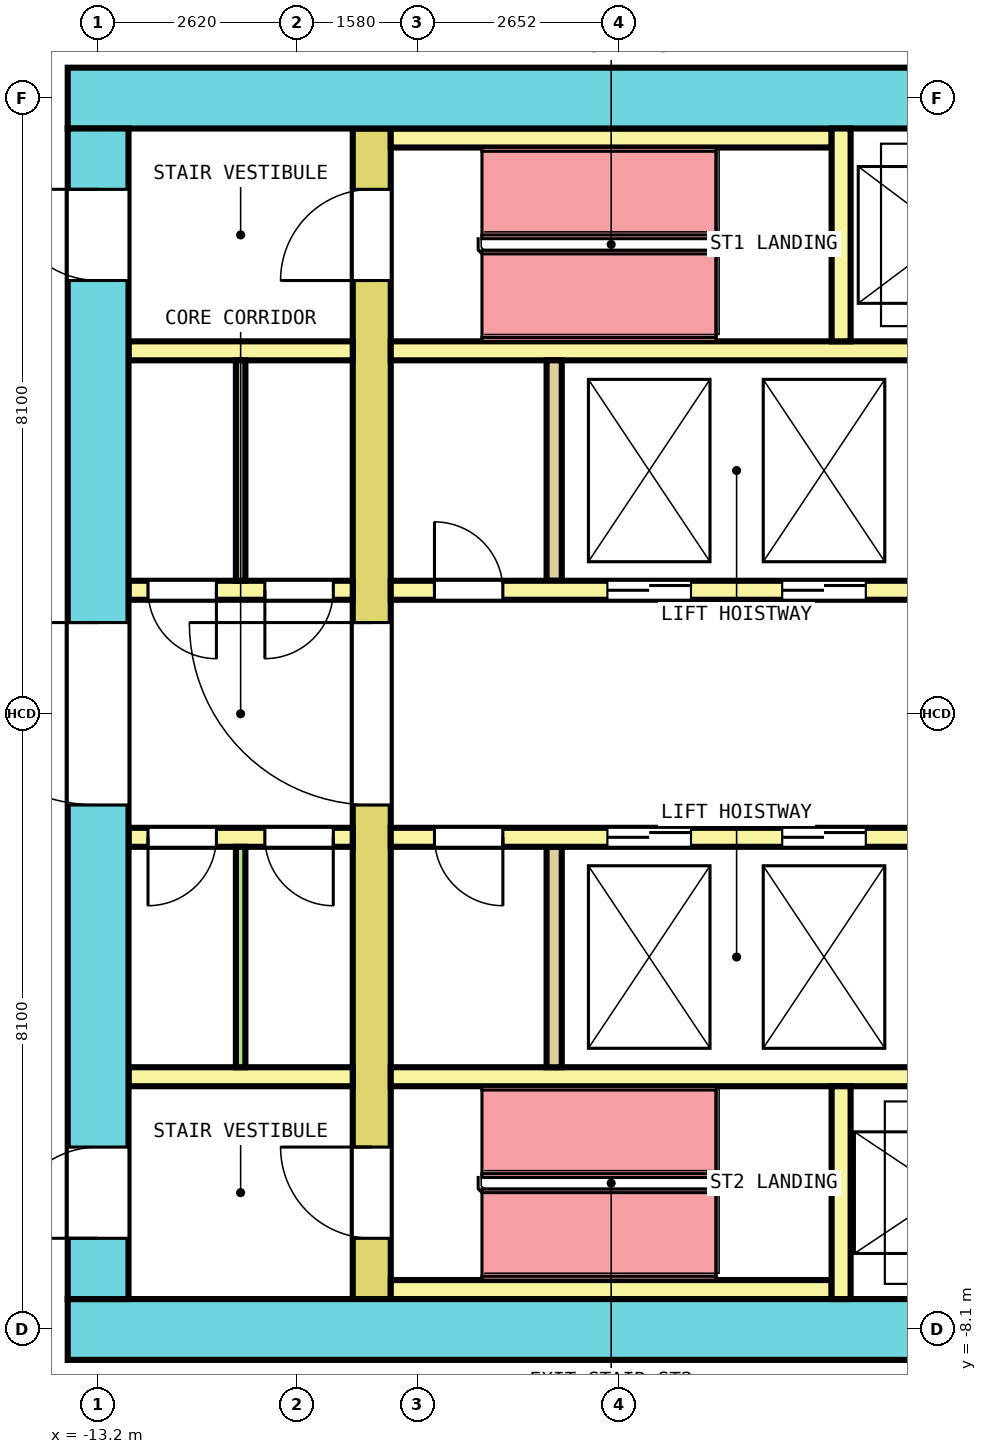
"""IFC4 building model, lengths in metres.
Left out: names, types, materials, properties, quantities, classifications, styles, units other than length and angle.
Written with IfcOpenShell. Run it as: python <this file> out.ifc"""

import sys

from ifc_helpers import new_model, si_unit, direction, frame, frame_2d, origin, place, context, subcontext, project, spatial, rectangle, extrude, element, fill, save


model = new_model("IFC4")
c1 = context("Model", 3, precision=1e-05, world=origin(), true_north=direction((0.0, 1.0)))
c2 = subcontext(c1, "Body", "Model", "MODEL_VIEW")
j1 = project(units=[si_unit("LENGTHUNIT", "METRE"), si_unit("PLANEANGLEUNIT", "RADIAN")], contexts=[c1])
p1 = place(None, origin())
s1 = spatial("IfcSite", under=j1, at=p1, CompositionType="ELEMENT")
p2 = place(p1, origin())
s2 = spatial("IfcBuilding", under=s1, at=p2, CompositionType="ELEMENT")
p3 = place(p2, frame((0.0, 0.0, 122.0)))
s3 = spatial("IfcBuildingStorey", under=s2, at=p3, CompositionType="ELEMENT", Elevation=122.0)
p4 = place(p3, frame((-13.6, 8.1, 0.0), z_axis=(0.0, 0.0, 1.0), x_axis=(1.0, 0.0, 0.0)))
e1 = element("IfcWall", 1, at=p4, inside=s3, PredefinedType="SHEAR", context=c2, shape_type="SweptSolid", body=[
    extrude(rectangle(XDim=27.2, YDim=0.8, at=frame_2d((13.6, 0.0))), origin(), (0.0, 0.0, 1.0), 4.1),
])
p5 = place(p4, frame((14.525, 0.0, 0.0)))
e2 = element("IfcOpeningElement", 2, at=p5, cuts=e1, PredefinedType="OPENING", context=c2, shape_type="SweptSolid", body=[
    extrude(rectangle(XDim=1.4, YDim=2.1, at=frame_2d((0.7, 1.05))), frame((0.0, 0.41, 0.0), z_axis=(0.0, -1.0, 0.0), x_axis=(1.0, 0.0, 0.0)), (0.0, 0.0, 1.0), 0.82),
])
p6 = place(p3, frame((-13.6, -8.1, 0.0), z_axis=(0.0, 0.0, 1.0), x_axis=(1.0, 0.0, 0.0)))
e3 = element("IfcWall", 3, at=p6, inside=s3, PredefinedType="SHEAR", context=c2, shape_type="SweptSolid", body=[
    extrude(rectangle(XDim=27.2, YDim=0.8, at=frame_2d((13.6, 0.0))), origin(), (0.0, 0.0, 1.0), 4.1),
])
p7 = place(p6, frame((15.15, 0.0, 0.0)))
e4 = element("IfcOpeningElement", 4, at=p7, cuts=e3, PredefinedType="OPENING", context=c2, shape_type="SweptSolid", body=[
    extrude(rectangle(XDim=1.2, YDim=2.1, at=frame_2d((0.6, 1.05))), frame((0.0, 0.41, 0.0), z_axis=(0.0, -1.0, 0.0), x_axis=(1.0, 0.0, 0.0)), (0.0, 0.0, 1.0), 0.82),
])
p8 = place(p3, frame((-13.2, -7.7, 0.0), z_axis=(0.0, 0.0, 1.0), x_axis=(0.0, 1.0, 0.0)))
e5 = element("IfcWall", 5, at=p8, inside=s3, PredefinedType="SHEAR", context=c2, shape_type="SweptSolid", body=[
    extrude(rectangle(XDim=15.4, YDim=0.8, at=frame_2d((7.7, 0.0))), origin(), (0.0, 0.0, 1.0), 4.1),
])
p9 = place(p8, frame((6.5, 0.0, 0.0)))
e6 = element("IfcOpeningElement", 6, at=p9, cuts=e5, PredefinedType="OPENING", context=c2, shape_type="SweptSolid", body=[
    extrude(rectangle(XDim=2.4, YDim=2.1, at=frame_2d((1.2, 1.05))), frame((0.0, 0.41, 0.0), z_axis=(0.0, -1.0, 0.0), x_axis=(1.0, 0.0, 0.0)), (0.0, 0.0, 1.0), 0.82),
])
p10 = place(p8, frame((13.4, 0.0, 0.0)))
e7 = element("IfcOpeningElement", 7, at=p10, cuts=e5, PredefinedType="OPENING", context=c2, shape_type="SweptSolid", body=[
    extrude(rectangle(XDim=1.2, YDim=2.1, at=frame_2d((0.6, 1.05))), frame((0.0, 0.41, 0.0), z_axis=(0.0, -1.0, 0.0), x_axis=(1.0, 0.0, 0.0)), (0.0, 0.0, 1.0), 0.82),
])
p11 = place(p8, frame((0.8, 0.0, 0.0)))
e8 = element("IfcOpeningElement", 8, at=p11, cuts=e5, PredefinedType="OPENING", context=c2, shape_type="SweptSolid", body=[
    extrude(rectangle(XDim=1.2, YDim=2.1, at=frame_2d((0.6, 1.05))), frame((0.0, 0.41, 0.0), z_axis=(0.0, -1.0, 0.0), x_axis=(1.0, 0.0, 0.0)), (0.0, 0.0, 1.0), 0.82),
])
p12 = place(p3, frame((-9.6, -7.7, 0.0), z_axis=(0.0, 0.0, 1.0), x_axis=(0.0, 1.0, 0.0)))
e9 = element("IfcWall", 9, at=p12, inside=s3, PredefinedType="SHEAR", context=c2, shape_type="SweptSolid", body=[
    extrude(rectangle(XDim=15.4, YDim=0.5, at=frame_2d((7.7, 0.0))), origin(), (0.0, 0.0, 1.0), 4.1),
])
p13 = place(p12, frame((6.5, 0.0, 0.0)))
e10 = element("IfcOpeningElement", 10, at=p13, cuts=e9, PredefinedType="OPENING", context=c2, shape_type="SweptSolid", body=[
    extrude(rectangle(XDim=2.4, YDim=2.1, at=frame_2d((1.2, 1.05))), frame((0.0, 0.26, 0.0), z_axis=(0.0, -1.0, 0.0), x_axis=(1.0, 0.0, 0.0)), (0.0, 0.0, 1.0), 0.52),
])
p14 = place(p12, frame((13.4, 0.0, 0.0)))
e11 = element("IfcOpeningElement", 11, at=p14, cuts=e9, PredefinedType="OPENING", context=c2, shape_type="SweptSolid", body=[
    extrude(rectangle(XDim=1.2, YDim=2.1, at=frame_2d((0.6, 1.05))), frame((0.0, 0.26, 0.0), z_axis=(0.0, -1.0, 0.0), x_axis=(1.0, 0.0, 0.0)), (0.0, 0.0, 1.0), 0.52),
])
p15 = place(p12, frame((0.8, 0.0, 0.0)))
e12 = element("IfcOpeningElement", 12, at=p15, cuts=e9, PredefinedType="OPENING", context=c2, shape_type="SweptSolid", body=[
    extrude(rectangle(XDim=1.2, YDim=2.1, at=frame_2d((0.6, 1.05))), frame((0.0, 0.26, 0.0), z_axis=(0.0, -1.0, 0.0), x_axis=(1.0, 0.0, 0.0)), (0.0, 0.0, 1.0), 0.52),
])
p16 = place(p3, frame((-12.8, 1.625, 0.0), z_axis=(0.0, 0.0, 1.0), x_axis=(1.0, 0.0, 0.0)))
e13 = element("IfcWall", 13, at=p16, inside=s3, PredefinedType="SOLIDWALL", context=c2, shape_type="SweptSolid", body=[
    extrude(rectangle(XDim=2.95, YDim=0.25, at=frame_2d((1.475, 0.0))), origin(), (0.0, 0.0, 1.0), 4.1),
])
p17 = place(p16, frame((0.256, 0.0, 0.0)))
e14 = element("IfcOpeningElement", 14, at=p17, cuts=e13, PredefinedType="OPENING", context=c2, shape_type="SweptSolid", body=[
    extrude(rectangle(XDim=0.9, YDim=2.1, at=frame_2d((0.45, 1.05))), frame((0.0, 0.135, 0.0), z_axis=(0.0, -1.0, 0.0), x_axis=(1.0, 0.0, 0.0)), (0.0, 0.0, 1.0), 0.27),
])
p18 = place(p16, frame((1.794, 0.0, 0.0)))
e15 = element("IfcOpeningElement", 15, at=p18, cuts=e13, PredefinedType="OPENING", context=c2, shape_type="SweptSolid", body=[
    extrude(rectangle(XDim=0.9, YDim=2.1, at=frame_2d((0.45, 1.05))), frame((0.0, 0.135, 0.0), z_axis=(0.0, -1.0, 0.0), x_axis=(1.0, 0.0, 0.0)), (0.0, 0.0, 1.0), 0.27),
])
p19 = place(p3, frame((-9.35, 1.625, 0.0), z_axis=(0.0, 0.0, 1.0), x_axis=(1.0, 0.0, 0.0)))
e16 = element("IfcWall", 16, at=p19, inside=s3, PredefinedType="SOLIDWALL", context=c2, shape_type="SweptSolid", body=[
    extrude(rectangle(XDim=18.7, YDim=0.25, at=frame_2d((9.35, 0.0))), origin(), (0.0, 0.0, 1.0), 4.1),
])
p20 = place(p19, frame((2.85, 0.0, 0.0)))
e17 = element("IfcOpeningElement", 17, at=p20, cuts=e16, PredefinedType="OPENING", context=c2, shape_type="SweptSolid", body=[
    extrude(rectangle(XDim=1.1, YDim=2.1, at=frame_2d((0.55, 1.05))), frame((0.0, 0.135, 0.0), z_axis=(0.0, -1.0, 0.0), x_axis=(1.0, 0.0, 0.0)), (0.0, 0.0, 1.0), 0.27),
])
p21 = place(p19, frame((5.15, 0.0, 0.0)))
e18 = element("IfcOpeningElement", 18, at=p21, cuts=e16, PredefinedType="OPENING", context=c2, shape_type="SweptSolid", body=[
    extrude(rectangle(XDim=1.1, YDim=2.1, at=frame_2d((0.55, 1.05))), frame((0.0, 0.135, 0.0), z_axis=(0.0, -1.0, 0.0), x_axis=(1.0, 0.0, 0.0)), (0.0, 0.0, 1.0), 0.27),
])
p22 = place(p19, frame((14.8, 0.0, 0.0)))
e19 = element("IfcOpeningElement", 19, at=p22, cuts=e16, PredefinedType="OPENING", context=c2, shape_type="SweptSolid", body=[
    extrude(rectangle(XDim=1.1, YDim=2.1, at=frame_2d((0.55, 1.05))), frame((0.0, 0.135, 0.0), z_axis=(0.0, -1.0, 0.0), x_axis=(1.0, 0.0, 0.0)), (0.0, 0.0, 1.0), 0.27),
])
p23 = place(p19, frame((0.575, 0.0, 0.0)))
e20 = element("IfcOpeningElement", 20, at=p23, cuts=e16, PredefinedType="OPENING", context=c2, shape_type="SweptSolid", body=[
    extrude(rectangle(XDim=0.9, YDim=2.1, at=frame_2d((0.45, 1.05))), frame((0.0, 0.135, 0.0), z_axis=(0.0, -1.0, 0.0), x_axis=(1.0, 0.0, 0.0)), (0.0, 0.0, 1.0), 0.27),
])
p24 = place(p19, frame((17.225, 0.0, 0.0)))
e21 = element("IfcOpeningElement", 21, at=p24, cuts=e16, PredefinedType="OPENING", context=c2, shape_type="SweptSolid", body=[
    extrude(rectangle(XDim=0.9, YDim=2.1, at=frame_2d((0.45, 1.05))), frame((0.0, 0.135, 0.0), z_axis=(0.0, -1.0, 0.0), x_axis=(1.0, 0.0, 0.0)), (0.0, 0.0, 1.0), 0.27),
])
p25 = place(p3, frame((-12.8, 4.775, 0.0), z_axis=(0.0, 0.0, 1.0), x_axis=(1.0, 0.0, 0.0)))
e22 = element("IfcWall", 22, at=p25, inside=s3, PredefinedType="SOLIDWALL", context=c2, shape_type="SweptSolid", body=[
    extrude(rectangle(XDim=2.95, YDim=0.25, at=frame_2d((1.475, 0.0))), origin(), (0.0, 0.0, 1.0), 4.1),
])
p26 = place(p3, frame((-9.35, 4.775, 0.0), z_axis=(0.0, 0.0, 1.0), x_axis=(1.0, 0.0, 0.0)))
e23 = element("IfcWall", 23, at=p26, inside=s3, PredefinedType="SOLIDWALL", context=c2, shape_type="SweptSolid", body=[
    extrude(rectangle(XDim=18.7, YDim=0.25, at=frame_2d((9.35, 0.0))), origin(), (0.0, 0.0, 1.0), 4.1),
])
p27 = place(p3, frame((-7.2, 1.75, 0.0), z_axis=(0.0, 0.0, 1.0), x_axis=(0.0, 1.0, 0.0)))
e24 = element("IfcWall", 24, at=p27, inside=s3, PredefinedType="SOLIDWALL", context=c2, shape_type="SweptSolid", body=[
    extrude(rectangle(XDim=2.9, YDim=0.2, at=frame_2d((1.45, 0.0))), origin(), (0.0, 0.0, 1.0), 4.1),
])
p28 = place(p3, frame((-12.8, -1.625, 0.0), z_axis=(0.0, 0.0, 1.0), x_axis=(1.0, 0.0, 0.0)))
e25 = element("IfcWall", 25, at=p28, inside=s3, PredefinedType="SOLIDWALL", context=c2, shape_type="SweptSolid", body=[
    extrude(rectangle(XDim=2.95, YDim=0.25, at=frame_2d((1.475, 0.0))), origin(), (0.0, 0.0, 1.0), 4.1),
])
p29 = place(p28, frame((0.256, 0.0, 0.0)))
e26 = element("IfcOpeningElement", 26, at=p29, cuts=e25, PredefinedType="OPENING", context=c2, shape_type="SweptSolid", body=[
    extrude(rectangle(XDim=0.9, YDim=2.1, at=frame_2d((0.45, 1.05))), frame((0.0, 0.135, 0.0), z_axis=(0.0, -1.0, 0.0), x_axis=(1.0, 0.0, 0.0)), (0.0, 0.0, 1.0), 0.27),
])
p30 = place(p28, frame((1.794, 0.0, 0.0)))
e27 = element("IfcOpeningElement", 27, at=p30, cuts=e25, PredefinedType="OPENING", context=c2, shape_type="SweptSolid", body=[
    extrude(rectangle(XDim=0.9, YDim=2.1, at=frame_2d((0.45, 1.05))), frame((0.0, 0.135, 0.0), z_axis=(0.0, -1.0, 0.0), x_axis=(1.0, 0.0, 0.0)), (0.0, 0.0, 1.0), 0.27),
])
p31 = place(p3, frame((-9.35, -1.625, 0.0), z_axis=(0.0, 0.0, 1.0), x_axis=(1.0, 0.0, 0.0)))
e28 = element("IfcWall", 28, at=p31, inside=s3, PredefinedType="SOLIDWALL", context=c2, shape_type="SweptSolid", body=[
    extrude(rectangle(XDim=18.7, YDim=0.25, at=frame_2d((9.35, 0.0))), origin(), (0.0, 0.0, 1.0), 4.1),
])
p32 = place(p31, frame((2.85, 0.0, 0.0)))
e29 = element("IfcOpeningElement", 29, at=p32, cuts=e28, PredefinedType="OPENING", context=c2, shape_type="SweptSolid", body=[
    extrude(rectangle(XDim=1.1, YDim=2.1, at=frame_2d((0.55, 1.05))), frame((0.0, 0.135, 0.0), z_axis=(0.0, -1.0, 0.0), x_axis=(1.0, 0.0, 0.0)), (0.0, 0.0, 1.0), 0.27),
])
p33 = place(p31, frame((5.15, 0.0, 0.0)))
e30 = element("IfcOpeningElement", 30, at=p33, cuts=e28, PredefinedType="OPENING", context=c2, shape_type="SweptSolid", body=[
    extrude(rectangle(XDim=1.1, YDim=2.1, at=frame_2d((0.55, 1.05))), frame((0.0, 0.135, 0.0), z_axis=(0.0, -1.0, 0.0), x_axis=(1.0, 0.0, 0.0)), (0.0, 0.0, 1.0), 0.27),
])
p34 = place(p31, frame((14.8, 0.0, 0.0)))
e31 = element("IfcOpeningElement", 31, at=p34, cuts=e28, PredefinedType="OPENING", context=c2, shape_type="SweptSolid", body=[
    extrude(rectangle(XDim=1.1, YDim=2.1, at=frame_2d((0.55, 1.05))), frame((0.0, 0.135, 0.0), z_axis=(0.0, -1.0, 0.0), x_axis=(1.0, 0.0, 0.0)), (0.0, 0.0, 1.0), 0.27),
])
p35 = place(p31, frame((0.575, 0.0, 0.0)))
e32 = element("IfcOpeningElement", 32, at=p35, cuts=e28, PredefinedType="OPENING", context=c2, shape_type="SweptSolid", body=[
    extrude(rectangle(XDim=0.9, YDim=2.1, at=frame_2d((0.45, 1.05))), frame((0.0, 0.135, 0.0), z_axis=(0.0, -1.0, 0.0), x_axis=(1.0, 0.0, 0.0)), (0.0, 0.0, 1.0), 0.27),
])
p36 = place(p31, frame((17.225, 0.0, 0.0)))
e33 = element("IfcOpeningElement", 33, at=p36, cuts=e28, PredefinedType="OPENING", context=c2, shape_type="SweptSolid", body=[
    extrude(rectangle(XDim=0.9, YDim=2.1, at=frame_2d((0.45, 1.05))), frame((0.0, 0.135, 0.0), z_axis=(0.0, -1.0, 0.0), x_axis=(1.0, 0.0, 0.0)), (0.0, 0.0, 1.0), 0.27),
])
p37 = place(p3, frame((-12.8, -4.775, 0.0), z_axis=(0.0, 0.0, 1.0), x_axis=(1.0, 0.0, 0.0)))
e34 = element("IfcWall", 34, at=p37, inside=s3, PredefinedType="SOLIDWALL", context=c2, shape_type="SweptSolid", body=[
    extrude(rectangle(XDim=2.95, YDim=0.25, at=frame_2d((1.475, 0.0))), origin(), (0.0, 0.0, 1.0), 4.1),
])
p38 = place(p3, frame((-9.35, -4.775, 0.0), z_axis=(0.0, 0.0, 1.0), x_axis=(1.0, 0.0, 0.0)))
e35 = element("IfcWall", 35, at=p38, inside=s3, PredefinedType="SOLIDWALL", context=c2, shape_type="SweptSolid", body=[
    extrude(rectangle(XDim=18.7, YDim=0.25, at=frame_2d((9.35, 0.0))), origin(), (0.0, 0.0, 1.0), 4.1),
])
p39 = place(p3, frame((-7.2, -4.65, 0.0), z_axis=(0.0, 0.0, 1.0), x_axis=(0.0, 1.0, 0.0)))
e36 = element("IfcWall", 36, at=p39, inside=s3, PredefinedType="SOLIDWALL", context=c2, shape_type="SweptSolid", body=[
    extrude(rectangle(XDim=2.9, YDim=0.2, at=frame_2d((1.45, 0.0))), origin(), (0.0, 0.0, 1.0), 4.1),
])
p40 = place(p3, frame((-9.35, 7.575, 0.0), z_axis=(0.0, 0.0, 1.0), x_axis=(1.0, 0.0, 0.0)))
e37 = element("IfcWall", 37, at=p40, inside=s3, PredefinedType="SOLIDWALL", context=c2, shape_type="SweptSolid", body=[
    extrude(rectangle(XDim=5.8, YDim=0.25, at=frame_2d((2.9, 0.0))), origin(), (0.0, 0.0, 1.0), 4.1),
])
p41 = place(p3, frame((-3.425, 4.9, 0.0), z_axis=(0.0, 0.0, 1.0), x_axis=(0.0, 1.0, 0.0)))
e38 = element("IfcWall", 38, at=p41, inside=s3, PredefinedType="SOLIDWALL", context=c2, shape_type="SweptSolid", body=[
    extrude(rectangle(XDim=2.8, YDim=0.25, at=frame_2d((1.4, 0.0))), origin(), (0.0, 0.0, 1.0), 4.1),
])
p42 = place(p3, frame((-9.35, -7.575, 0.0), z_axis=(0.0, 0.0, 1.0), x_axis=(1.0, 0.0, 0.0)))
e39 = element("IfcWall", 39, at=p42, inside=s3, PredefinedType="SOLIDWALL", context=c2, shape_type="SweptSolid", body=[
    extrude(rectangle(XDim=5.8, YDim=0.25, at=frame_2d((2.9, 0.0))), origin(), (0.0, 0.0, 1.0), 4.1),
])
p43 = place(p3, frame((-3.425, -7.7, 0.0), z_axis=(0.0, 0.0, 1.0), x_axis=(0.0, 1.0, 0.0)))
e40 = element("IfcWall", 40, at=p43, inside=s3, PredefinedType="SOLIDWALL", context=c2, shape_type="SweptSolid", body=[
    extrude(rectangle(XDim=2.8, YDim=0.25, at=frame_2d((1.4, 0.0))), origin(), (0.0, 0.0, 1.0), 4.1),
])
for number, where, z_axis, x_axis in (
    (41, (-11.325, 1.75, 0.0), (0.0, 0.0, 1.0), (0.0, 1.0, 0.0)),
    (42, (-11.325, -4.65, 0.0), (0.0, 0.0, 1.0), (0.0, 1.0, 0.0)),
):
    element("IfcWall", number, at=place(p3, frame(where, z_axis=z_axis, x_axis=x_axis)), inside=s3, PredefinedType="PARTITIONING", context=c2, shape_type="SweptSolid", body=[
        extrude(rectangle(XDim=2.9, YDim=0.125, at=frame_2d((1.45, 0.0))), origin(), (0.0, 0.0, 1.0), 4.1),
    ])
p44 = place(p20, origin())
e43 = element("IfcDoor", 43, at=p44, inside=s3, OperationType="DOUBLE_DOOR_SLIDING", PredefinedType="DOOR", context=c2, shape_type="SweptSolid", body=[
    extrude(rectangle(XDim=1.1, YDim=2.1, at=frame_2d((0.55, 1.05))), frame((0.0, 0.075, 0.0), z_axis=(0.0, -1.0, 0.0), x_axis=(1.0, 0.0, 0.0)), (0.0, 0.0, 1.0), 0.15),
])
fill(e17, e43)
p45 = place(p21, origin())
e44 = element("IfcDoor", 44, at=p45, inside=s3, OperationType="DOUBLE_DOOR_SLIDING", PredefinedType="DOOR", context=c2, shape_type="SweptSolid", body=[
    extrude(rectangle(XDim=1.1, YDim=2.1, at=frame_2d((0.55, 1.05))), frame((0.0, 0.075, 0.0), z_axis=(0.0, -1.0, 0.0), x_axis=(1.0, 0.0, 0.0)), (0.0, 0.0, 1.0), 0.15),
])
fill(e18, e44)
p46 = place(p32, origin())
e45 = element("IfcDoor", 45, at=p46, inside=s3, OperationType="DOUBLE_DOOR_SLIDING", PredefinedType="DOOR", context=c2, shape_type="SweptSolid", body=[
    extrude(rectangle(XDim=1.1, YDim=2.1, at=frame_2d((0.55, 1.05))), frame((0.0, 0.075, 0.0), z_axis=(0.0, -1.0, 0.0), x_axis=(1.0, 0.0, 0.0)), (0.0, 0.0, 1.0), 0.15),
])
fill(e29, e45)
p47 = place(p33, origin())
e46 = element("IfcDoor", 46, at=p47, inside=s3, OperationType="DOUBLE_DOOR_SLIDING", PredefinedType="DOOR", context=c2, shape_type="SweptSolid", body=[
    extrude(rectangle(XDim=1.1, YDim=2.1, at=frame_2d((0.55, 1.05))), frame((0.0, 0.075, 0.0), z_axis=(0.0, -1.0, 0.0), x_axis=(1.0, 0.0, 0.0)), (0.0, 0.0, 1.0), 0.15),
])
fill(e30, e46)
p48 = place(p13, origin())
e47 = element("IfcDoor", 47, at=p48, inside=s3, OperationType="DOUBLE_DOOR_SINGLE_SWING", PredefinedType="DOOR", context=c2, shape_type="SweptSolid", body=[
    extrude(rectangle(XDim=2.4, YDim=2.1, at=frame_2d((1.2, 1.05))), frame((0.0, 0.2, 0.0), z_axis=(0.0, -1.0, 0.0), x_axis=(1.0, 0.0, 0.0)), (0.0, 0.0, 1.0), 0.4),
])
fill(e10, e47)
p49 = place(p9, origin())
e48 = element("IfcDoor", 48, at=p49, inside=s3, OperationType="DOUBLE_DOOR_SINGLE_SWING", PredefinedType="DOOR", context=c2, shape_type="SweptSolid", body=[
    extrude(rectangle(XDim=2.4, YDim=2.1, at=frame_2d((1.2, 1.05))), frame((0.0, 0.3, 0.0), z_axis=(0.0, -1.0, 0.0), x_axis=(1.0, 0.0, 0.0)), (0.0, 0.0, 1.0), 0.6),
])
fill(e6, e48)
p50 = place(p14, origin())
e49 = element("IfcDoor", 49, at=p50, inside=s3, OperationType="SINGLE_SWING_RIGHT", PredefinedType="DOOR", context=c2, shape_type="SweptSolid", body=[
    extrude(rectangle(XDim=1.2, YDim=2.1, at=frame_2d((0.6, 1.05))), frame((0.0, 0.2, 0.0), z_axis=(0.0, -1.0, 0.0), x_axis=(1.0, 0.0, 0.0)), (0.0, 0.0, 1.0), 0.4),
])
fill(e11, e49)
p51 = place(p10, origin())
e50 = element("IfcDoor", 50, at=p51, inside=s3, OperationType="SINGLE_SWING_LEFT", PredefinedType="DOOR", context=c2, shape_type="SweptSolid", body=[
    extrude(rectangle(XDim=1.2, YDim=2.1, at=frame_2d((0.6, 1.05))), frame((0.0, 0.3, 0.0), z_axis=(0.0, -1.0, 0.0), x_axis=(1.0, 0.0, 0.0)), (0.0, 0.0, 1.0), 0.6),
])
fill(e7, e50)
p52 = place(p15, origin())
e51 = element("IfcDoor", 51, at=p52, inside=s3, OperationType="SINGLE_SWING_RIGHT", PredefinedType="DOOR", context=c2, shape_type="SweptSolid", body=[
    extrude(rectangle(XDim=1.2, YDim=2.1, at=frame_2d((0.6, 1.05))), frame((0.0, 0.2, 0.0), z_axis=(0.0, -1.0, 0.0), x_axis=(1.0, 0.0, 0.0)), (0.0, 0.0, 1.0), 0.4),
])
fill(e12, e51)
p53 = place(p11, origin())
e52 = element("IfcDoor", 52, at=p53, inside=s3, OperationType="SINGLE_SWING_LEFT", PredefinedType="DOOR", context=c2, shape_type="SweptSolid", body=[
    extrude(rectangle(XDim=1.2, YDim=2.1, at=frame_2d((0.6, 1.05))), frame((0.0, 0.3, 0.0), z_axis=(0.0, -1.0, 0.0), x_axis=(1.0, 0.0, 0.0)), (0.0, 0.0, 1.0), 0.6),
])
fill(e8, e52)
p54 = place(p17, origin())
e53 = element("IfcDoor", 53, at=p54, inside=s3, OperationType="SINGLE_SWING_RIGHT", PredefinedType="DOOR", context=c2, shape_type="SweptSolid", body=[
    extrude(rectangle(XDim=0.9, YDim=2.1, at=frame_2d((0.45, 1.05))), frame((0.0, 0.075, 0.0), z_axis=(0.0, -1.0, 0.0), x_axis=(1.0, 0.0, 0.0)), (0.0, 0.0, 1.0), 0.15),
])
fill(e14, e53)
p55 = place(p18, origin())
e54 = element("IfcDoor", 54, at=p55, inside=s3, OperationType="SINGLE_SWING_LEFT", PredefinedType="DOOR", context=c2, shape_type="SweptSolid", body=[
    extrude(rectangle(XDim=0.9, YDim=2.1, at=frame_2d((0.45, 1.05))), frame((0.0, 0.075, 0.0), z_axis=(0.0, -1.0, 0.0), x_axis=(1.0, 0.0, 0.0)), (0.0, 0.0, 1.0), 0.15),
])
fill(e15, e54)
p56 = place(p23, origin())
e55 = element("IfcDoor", 55, at=p56, inside=s3, OperationType="SINGLE_SWING_RIGHT", PredefinedType="DOOR", context=c2, shape_type="SweptSolid", body=[
    extrude(rectangle(XDim=0.9, YDim=2.1, at=frame_2d((0.45, 1.05))), frame((0.0, 0.075, 0.0), z_axis=(0.0, -1.0, 0.0), x_axis=(1.0, 0.0, 0.0)), (0.0, 0.0, 1.0), 0.15),
])
fill(e20, e55)
p57 = place(p29, origin())
e56 = element("IfcDoor", 56, at=p57, inside=s3, OperationType="SINGLE_SWING_RIGHT", PredefinedType="DOOR", context=c2, shape_type="SweptSolid", body=[
    extrude(rectangle(XDim=0.9, YDim=2.1, at=frame_2d((0.45, 1.05))), frame((0.0, 0.075, 0.0), z_axis=(0.0, -1.0, 0.0), x_axis=(1.0, 0.0, 0.0)), (0.0, 0.0, 1.0), 0.15),
])
fill(e26, e56)
p58 = place(p30, origin())
e57 = element("IfcDoor", 57, at=p58, inside=s3, OperationType="SINGLE_SWING_LEFT", PredefinedType="DOOR", context=c2, shape_type="SweptSolid", body=[
    extrude(rectangle(XDim=0.9, YDim=2.1, at=frame_2d((0.45, 1.05))), frame((0.0, 0.075, 0.0), z_axis=(0.0, -1.0, 0.0), x_axis=(1.0, 0.0, 0.0)), (0.0, 0.0, 1.0), 0.15),
])
fill(e27, e57)
p59 = place(p35, origin())
e58 = element("IfcDoor", 58, at=p59, inside=s3, OperationType="SINGLE_SWING_RIGHT", PredefinedType="DOOR", context=c2, shape_type="SweptSolid", body=[
    extrude(rectangle(XDim=0.9, YDim=2.1, at=frame_2d((0.45, 1.05))), frame((0.0, 0.075, 0.0), z_axis=(0.0, -1.0, 0.0), x_axis=(1.0, 0.0, 0.0)), (0.0, 0.0, 1.0), 0.15),
])
fill(e32, e58)
save(model, sys.argv[1])
